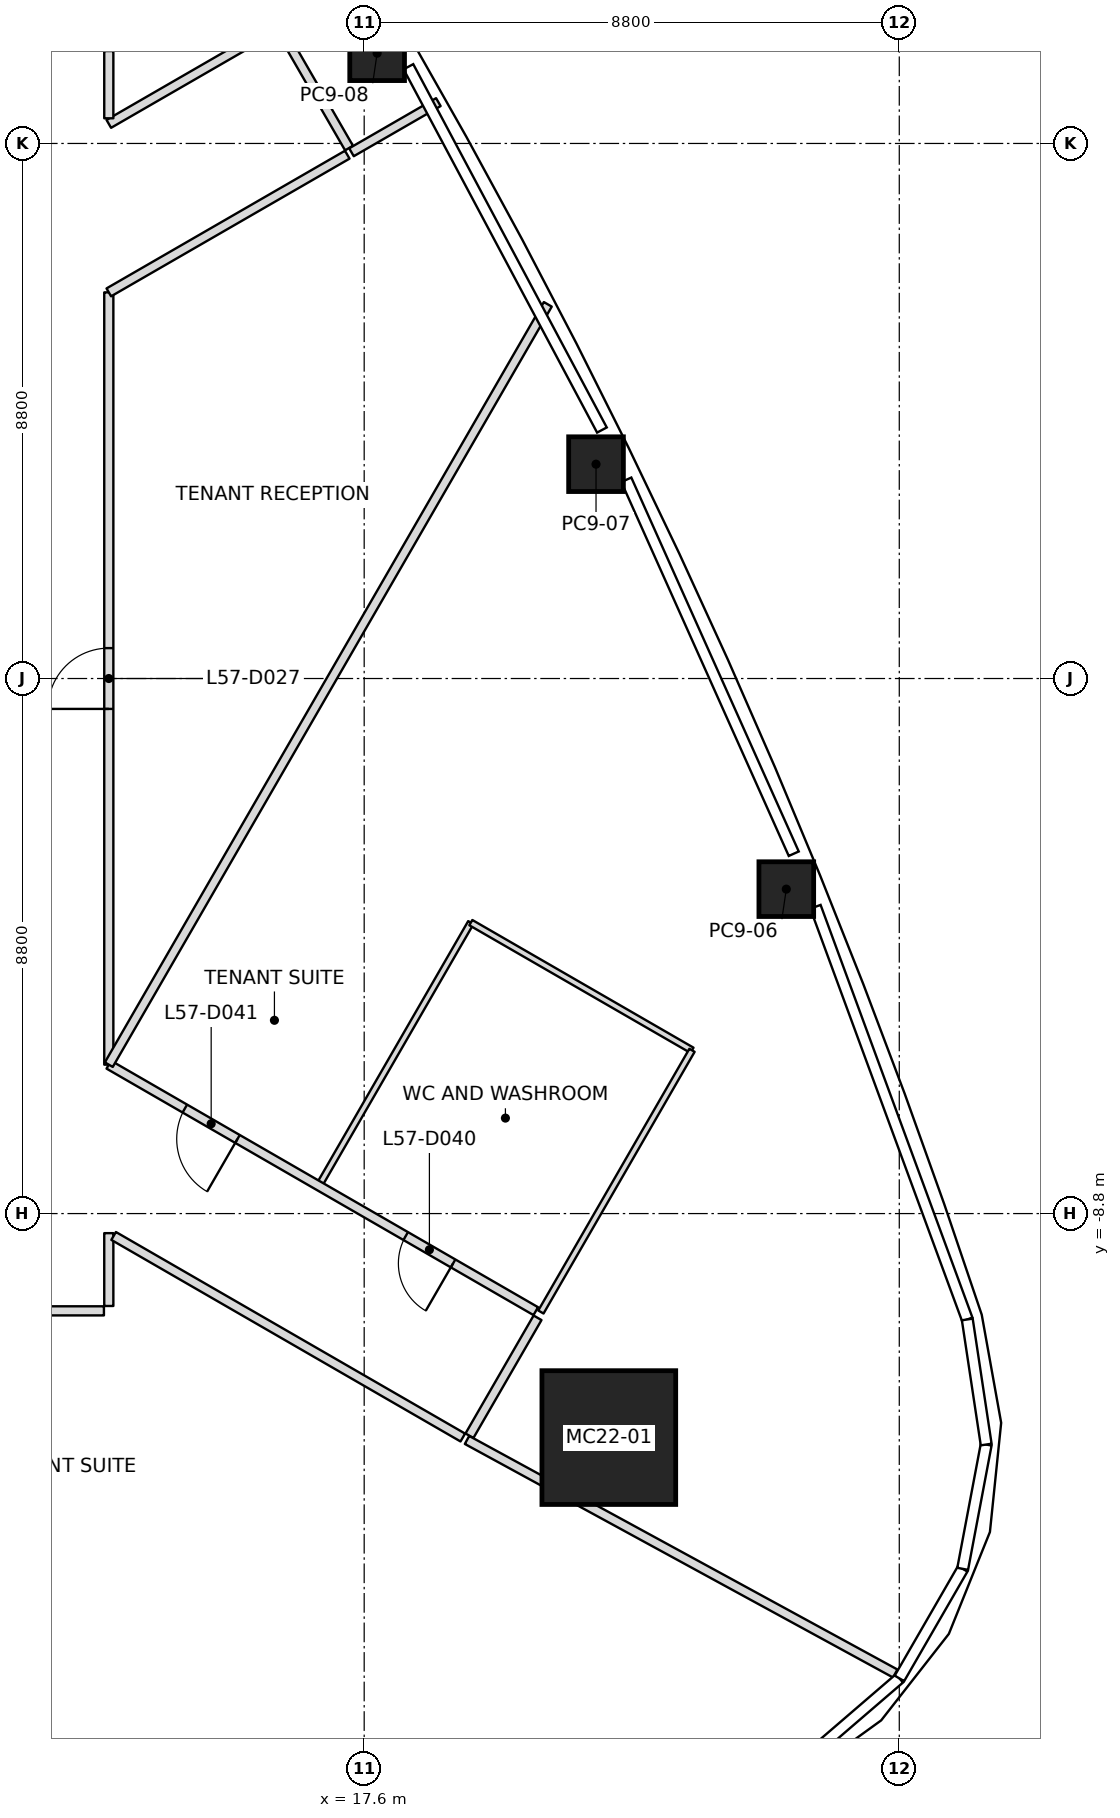
"""IFC4 building model, lengths in metres.
Left out: names, types, materials, properties, quantities, classifications, styles, units other than length and angle.
Written with IfcOpenShell. Run it as: python <this file> out.ifc"""

import sys

from ifc_helpers import new_model, si_unit, direction, frame, frame_2d, origin, origin_2d, place, context, subcontext, project, spatial, rectangle, extrude, element, fill, save


model = new_model("IFC4")
c1 = context("Model", 3, precision=1e-05, world=origin(), true_north=direction((0.0, 1.0)))
c2 = subcontext(c1, "Body", "Model", "MODEL_VIEW")
j1 = project(units=[si_unit("LENGTHUNIT", "METRE"), si_unit("PLANEANGLEUNIT", "RADIAN")], contexts=[c1])
p1 = place(None, origin())
s1 = spatial("IfcSite", under=j1, at=p1, CompositionType="ELEMENT")
p2 = place(p1, origin())
s2 = spatial("IfcBuilding", under=s1, at=p2, CompositionType="ELEMENT")
p3 = place(p2, frame((0.0, 0.0, 255.0)))
s3 = spatial("IfcBuildingStorey", under=s2, at=p3, CompositionType="ELEMENT", Elevation=255.0)
p4 = place(p3, frame((21.623, -12.484, 0.0), z_axis=(-0.027878633223, 0.016043939908, 0.999482553025), x_axis=(0.999611315367, 0.000447457036, 0.02787504211)))
e1 = element("IfcColumn", 1, at=p4, inside=s3, PredefinedType="COLUMN", context=c2, shape_type="SweptSolid", body=[
    extrude(rectangle(XDim=2.2, YDim=2.2, at=origin_2d()), origin(), (0.0, 0.0, 1.0), 4.002),
])
p5 = place(p3, frame((24.542, -3.464, 0.0), z_axis=(-0.017757551143, 0.009946669541, 0.999792845115), x_axis=(-0.377115446107, 0.926029581095, -0.01591085306)))
e2 = element("IfcColumn", 2, at=p5, inside=s3, PredefinedType="COLUMN", context=c2, shape_type="SweptSolid", body=[
    extrude(rectangle(XDim=0.9, YDim=0.9, at=origin_2d()), origin(), (0.0, 0.0, 1.0), 4.001),
])
p6 = place(p3, frame((21.413, 3.525, 0.0), z_axis=(-0.014097691364, 0.002013955909, 0.999898594398), x_axis=(-0.439572578629, 0.898171387712, -0.008006648038)))
e3 = element("IfcColumn", 3, at=p6, inside=s3, PredefinedType="COLUMN", context=c2, shape_type="SweptSolid", body=[
    extrude(rectangle(XDim=0.9, YDim=0.9, at=origin_2d()), origin(), (0.0, 0.0, 1.0), 4.0),
])
p7 = place(p3, frame((17.813, 10.284, 0.0), z_axis=(-0.00994807791, -0.005675897212, 0.999934407817), x_axis=(-0.499975258324, 0.866039685968, -5.8244404e-05)))
e4 = element("IfcColumn", 4, at=p7, inside=s3, PredefinedType="COLUMN", context=c2, shape_type="SweptSolid", body=[
    extrude(rectangle(XDim=0.9, YDim=0.9, at=origin_2d()), origin(), (0.0, 0.0, 1.0), 4.0),
])
p8 = place(p3, frame((20.62, 6.154, 0.0), z_axis=(0.0, 0.0, 1.0), x_axis=(-0.500001511722, -0.866024530989, 0.0)))
e5 = element("IfcWall", 5, at=p8, inside=s3, PredefinedType="PARTITIONING", context=c2, shape_type="SweptSolid", body=[
    extrude(rectangle(XDim=14.439, YDim=0.15, at=frame_2d((7.22, 0.0))), origin(), (0.0, 0.0, 1.0), 3.084),
])
p9 = place(p3, frame((17.391, 8.655, 0.0), z_axis=(0.0, 0.0, 1.0), x_axis=(0.865966208357, 0.500102515474, 0.0)))
e6 = element("IfcWall", 6, at=p9, inside=s3, PredefinedType="PARTITIONING", context=c2, shape_type="SweptSolid", body=[
    extrude(rectangle(XDim=1.65, YDim=0.15, at=frame_2d((0.825, 0.0))), origin(), (0.0, 0.0, 1.0), 3.084),
])
p10 = place(p3, frame((19.291, -12.523, 0.0), z_axis=(0.0, 0.0, 1.0), x_axis=(0.877903714692, -0.478837203787, 0.0)))
e7 = element("IfcWall", 7, at=p10, inside=s3, PredefinedType="PARTITIONING", context=c2, shape_type="SweptSolid", body=[
    extrude(rectangle(XDim=8.022, YDim=0.15, at=frame_2d((4.011, 0.0))), origin(), (0.0, 0.0, 1.0), 3.084),
])
p11 = place(p3, frame((1.2, -10.4, 0.0), z_axis=(0.0, 0.0, 1.0), x_axis=(1.0, 0.0, 0.0)))
e8 = element("IfcWall", 8, at=p11, inside=s3, PredefinedType="PARTITIONING", context=c2, shape_type="SweptSolid", body=[
    extrude(rectangle(XDim=12.12, YDim=0.15, at=frame_2d((6.06, 0.0))), origin(), (0.0, 0.0, 1.0), 3.167),
])
p12 = place(p11, frame((1.65, 0.0, 0.0)))
e9 = element("IfcOpeningElement", 9, at=p12, cuts=e8, PredefinedType="OPENING", context=c2, shape_type="SweptSolid", body=[
    extrude(rectangle(XDim=0.9, YDim=2.1, at=frame_2d((0.45, 1.05))), frame((0.0, 0.075, 0.0), z_axis=(0.0, -1.0, 0.0), x_axis=(1.0, 0.0, 0.0)), (0.0, 0.0, 1.0), 0.15),
])
p13 = place(p11, frame((7.75, 0.0, 0.0)))
e10 = element("IfcOpeningElement", 10, at=p13, cuts=e8, PredefinedType="OPENING", context=c2, shape_type="SweptSolid", body=[
    extrude(rectangle(XDim=1.0, YDim=2.1, at=frame_2d((0.5, 1.05))), frame((0.0, 0.075, 0.0), z_axis=(0.0, -1.0, 0.0), x_axis=(1.0, 0.0, 0.0)), (0.0, 0.0, 1.0), 0.15),
])
p14 = place(p3, frame((13.4, -10.32, 0.0), z_axis=(0.0, 0.0, 1.0), x_axis=(0.0, 1.0, 0.0)))
e11 = element("IfcWall", 11, at=p14, inside=s3, PredefinedType="PARTITIONING", context=c2, shape_type="SweptSolid", body=[
    extrude(rectangle(XDim=1.198, YDim=0.15, at=frame_2d((0.599, 0.0))), origin(), (0.0, 0.0, 1.0), 3.233),
])
p15 = place(p3, frame((13.479, -9.168, 0.0), z_axis=(0.0, 0.0, 1.0), x_axis=(0.866032307377, -0.499988042436, 0.0)))
e12 = element("IfcWall", 12, at=p15, inside=s3, PredefinedType="PARTITIONING", context=c2, shape_type="SweptSolid", body=[
    extrude(rectangle(XDim=6.631, YDim=0.15, at=frame_2d((3.315, 0.0))), origin(), (0.0, 0.0, 1.0), 3.233),
])
p16 = place(p3, frame((13.4, -6.351, 0.0), z_axis=(0.0, 0.0, 1.0), x_axis=(0.0, 1.0, 0.0)))
e13 = element("IfcWall", 13, at=p16, inside=s3, PredefinedType="PARTITIONING", context=c2, shape_type="SweptSolid", body=[
    extrude(rectangle(XDim=12.702, YDim=0.15, at=frame_2d((6.351, 0.0))), origin(), (0.0, 0.0, 1.0), 3.167),
])
p17 = place(p16, frame((5.851, 0.0, 0.0)))
e14 = element("IfcOpeningElement", 14, at=p17, cuts=e13, PredefinedType="OPENING", context=c2, shape_type="SweptSolid", body=[
    extrude(rectangle(XDim=1.0, YDim=2.1, at=frame_2d((0.5, 1.05))), frame((0.0, 0.075, 0.0), z_axis=(0.0, -1.0, 0.0), x_axis=(1.0, 0.0, 0.0)), (0.0, 0.0, 1.0), 0.15),
])
p18 = place(p3, frame((13.4, 6.351, 0.0), z_axis=(0.0, 0.0, 1.0), x_axis=(0.866038353239, 0.499977570215, 0.0)))
e15 = element("IfcWall", 15, at=p18, inside=s3, PredefinedType="PARTITIONING", context=c2, shape_type="SweptSolid", body=[
    extrude(rectangle(XDim=4.529, YDim=0.15, at=frame_2d((2.264, 0.0))), origin(), (0.0, 0.0, 1.0), 3.3),
])
p19 = place(p3, frame((20.422, -10.405, 0.0), z_axis=(0.0, 0.0, 1.0), x_axis=(-0.866035161949, 0.499983097982, 0.0)))
e16 = element("IfcWall", 16, at=p19, inside=s3, PredefinedType="PARTITIONING", context=c2, shape_type="SweptSolid", body=[
    extrude(rectangle(XDim=8.108, YDim=0.15, at=frame_2d((4.054, 0.0))), origin(), (0.0, 0.0, 1.0), 3.167),
])
p20 = place(p19, frame((1.57, 0.0, 0.0)))
e17 = element("IfcOpeningElement", 17, at=p20, cuts=e16, PredefinedType="OPENING", context=c2, shape_type="SweptSolid", body=[
    extrude(rectangle(XDim=0.9, YDim=2.1, at=frame_2d((0.45, 1.05))), frame((0.0, 0.075, 0.0), z_axis=(0.0, -1.0, 0.0), x_axis=(1.0, 0.0, 0.0)), (0.0, 0.0, 1.0), 0.15),
])
p21 = place(p19, frame((5.664, 0.0, 0.0)))
e18 = element("IfcOpeningElement", 18, at=p21, cuts=e16, PredefinedType="OPENING", context=c2, shape_type="SweptSolid", body=[
    extrude(rectangle(XDim=1.0, YDim=2.1, at=frame_2d((0.5, 1.05))), frame((0.0, 0.075, 0.0), z_axis=(0.0, -1.0, 0.0), x_axis=(1.0, 0.0, 0.0)), (0.0, 0.0, 1.0), 0.15),
])
p22 = place(p3, frame((16.122, 10.694, 0.0), z_axis=(0.0, 0.0, 1.0), x_axis=(-0.866001883582, -0.500040735972, 0.0)))
e19 = element("IfcWall", 19, at=p22, inside=s3, PredefinedType="PARTITIONING", context=c2, shape_type="SweptSolid", body=[
    extrude(rectangle(XDim=3.143, YDim=0.15, at=frame_2d((1.571, 0.0))), origin(), (0.0, 0.0, 1.0), 3.3),
])
p23 = place(p3, frame((13.4, 9.214, 0.0), z_axis=(0.0, 0.0, 1.0), x_axis=(0.0, 1.0, 0.0)))
e20 = element("IfcWall", 20, at=p23, inside=s3, PredefinedType="PARTITIONING", context=c2, shape_type="SweptSolid", body=[
    extrude(rectangle(XDim=1.106, YDim=0.15, at=frame_2d((0.553, 0.0))), origin(), (0.0, 0.0, 1.0), 3.3),
])
p24 = place(p3, frame((17.351, 8.724, 0.0), z_axis=(0.0, 0.0, 1.0), x_axis=(-0.500030632641, 0.866007717299, 0.0)))
e21 = element("IfcWall", 21, at=p24, inside=s3, PredefinedType="PARTITIONING", context=c2, shape_type="SweptSolid", body=[
    extrude(rectangle(XDim=2.24, YDim=0.15, at=frame_2d((1.12, 0.0))), origin(), (0.0, 0.0, 1.0), 3.3),
])
p25 = place(p3, frame((19.331, -12.454, 0.0), z_axis=(0.0, 0.0, 1.0), x_axis=(0.49994888933, 0.866054910533, 0.0)))
e22 = element("IfcWall", 22, at=p25, inside=s3, PredefinedType="PARTITIONING", context=c2, shape_type="SweptSolid", body=[
    extrude(rectangle(XDim=2.24, YDim=0.15, at=frame_2d((1.12, 0.0))), origin(), (0.0, 0.0, 1.0), 3.233),
])
p26 = place(p3, frame((16.869, -8.319, 0.0), z_axis=(0.0, 0.0, 1.0), x_axis=(0.500011595943, 0.86601870876, 0.0)))
e23 = element("IfcWall", 23, at=p26, inside=s3, PredefinedType="PARTITIONING", context=c2, shape_type="SweptSolid", body=[
    extrude(rectangle(XDim=4.97, YDim=0.1, at=frame_2d((2.485, 0.0))), origin(), (0.0, 0.0, 1.0), 3.167),
])
p27 = place(p3, frame((19.354, -4.015, 0.0), z_axis=(0.0, 0.0, 1.0), x_axis=(0.866034573852, -0.49998411664, 0.0)))
e24 = element("IfcWall", 24, at=p27, inside=s3, PredefinedType="PARTITIONING", context=c2, shape_type="SweptSolid", body=[
    extrude(rectangle(XDim=4.2, YDim=0.1, at=frame_2d((2.1, 0.0))), origin(), (0.0, 0.0, 1.0), 3.167),
])
p28 = place(p3, frame((22.991, -6.115, 0.0), z_axis=(0.0, 0.0, 1.0), x_axis=(-0.500011595943, -0.86601870876, 0.0)))
e25 = element("IfcWall", 25, at=p28, inside=s3, PredefinedType="PARTITIONING", context=c2, shape_type="SweptSolid", body=[
    extrude(rectangle(XDim=4.97, YDim=0.1, at=frame_2d((2.485, 0.0))), origin(), (0.0, 0.0, 1.0), 3.293),
])
p29 = place(p17, origin())
e26 = element("IfcDoor", 26, at=p29, inside=s3, OperationType="SINGLE_SWING_RIGHT", PredefinedType="DOOR", context=c2, shape_type="SweptSolid", body=[
    extrude(rectangle(XDim=1.0, YDim=2.1, at=frame_2d((0.5, 1.05))), frame((0.0, 0.025, 0.0), z_axis=(0.0, -1.0, 0.0), x_axis=(1.0, 0.0, 0.0)), (0.0, 0.0, 1.0), 0.05),
])
fill(e14, e26)
p30 = place(p20, origin())
e27 = element("IfcDoor", 27, at=p30, inside=s3, OperationType="SINGLE_SWING_RIGHT", PredefinedType="DOOR", context=c2, shape_type="SweptSolid", body=[
    extrude(rectangle(XDim=0.9, YDim=2.1, at=frame_2d((0.45, 1.05))), frame((0.0, 0.025, 0.0), z_axis=(0.0, -1.0, 0.0), x_axis=(1.0, 0.0, 0.0)), (0.0, 0.0, 1.0), 0.05),
])
fill(e17, e27)
p31 = place(p21, origin())
e28 = element("IfcDoor", 28, at=p31, inside=s3, OperationType="SINGLE_SWING_RIGHT", PredefinedType="DOOR", context=c2, shape_type="SweptSolid", body=[
    extrude(rectangle(XDim=1.0, YDim=2.1, at=frame_2d((0.5, 1.05))), frame((0.0, 0.025, 0.0), z_axis=(0.0, -1.0, 0.0), x_axis=(1.0, 0.0, 0.0)), (0.0, 0.0, 1.0), 0.05),
])
fill(e18, e28)
save(model, sys.argv[1])
